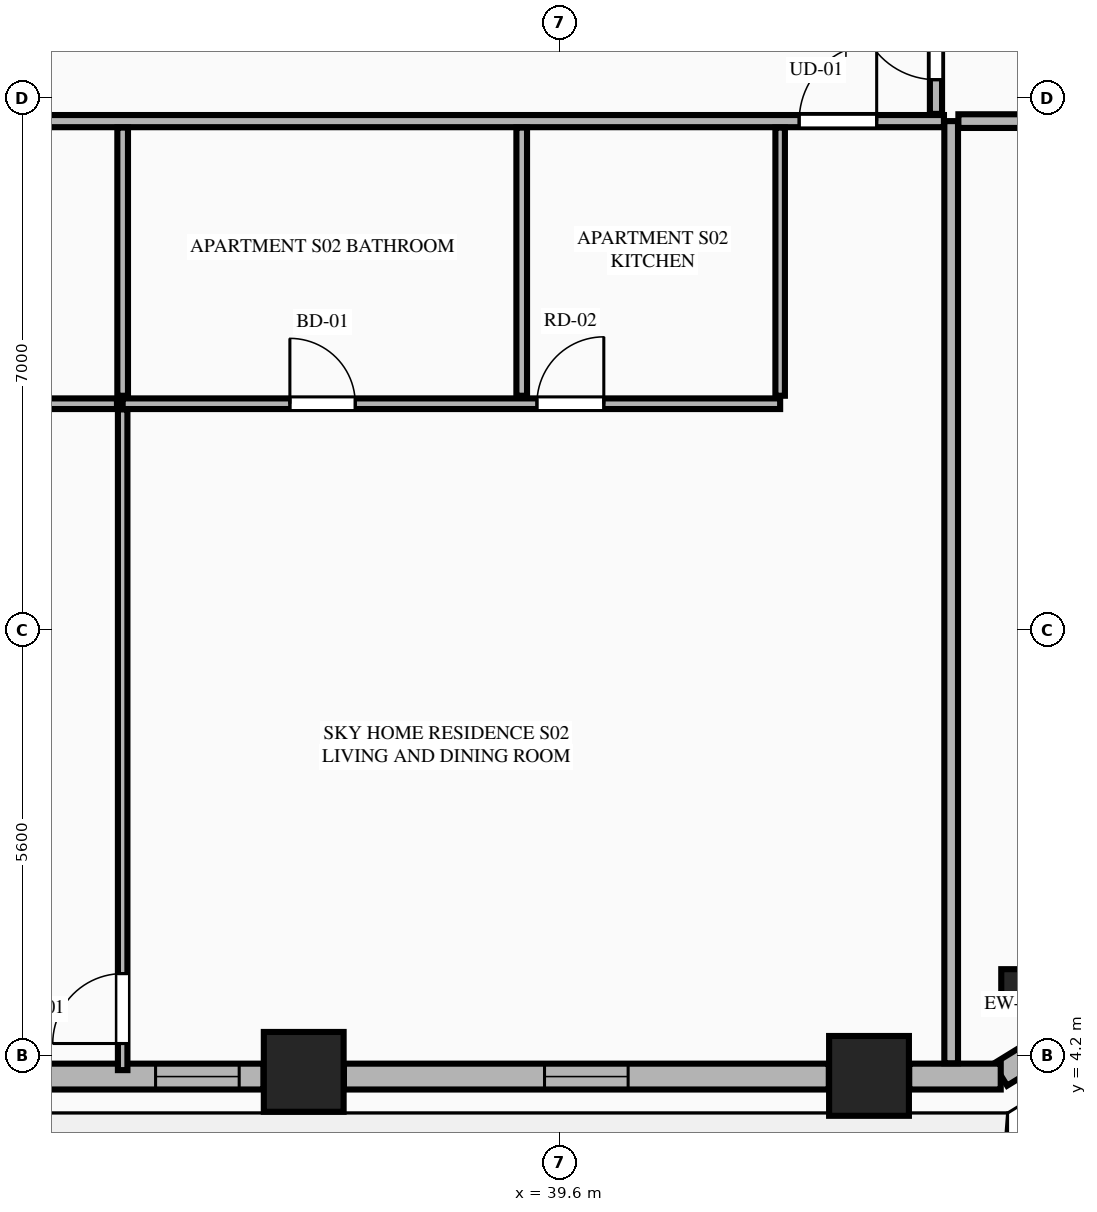
"""IFC4 building model, lengths in metres.
Left out: names, types, materials, properties, quantities, classifications, styles, units other than length and angle.
Written with IfcOpenShell. Run it as: python <this file> out.ifc"""

import sys

from ifc_helpers import new_model, si_unit, direction, frame, frame_2d, origin, origin_2d, place, context, subcontext, project, spatial, rectangle, extrude, element, fill, save


model = new_model("IFC4")
c1 = context("Model", 3, precision=1e-05, world=origin(), true_north=direction((0.0, 1.0)))
c2 = subcontext(c1, "Body", "Model", "MODEL_VIEW")
j1 = project(units=[si_unit("LENGTHUNIT", "METRE"), si_unit("PLANEANGLEUNIT", "RADIAN")], contexts=[c1])
p1 = place(None, origin())
s1 = spatial("IfcSite", under=j1, at=p1, CompositionType="ELEMENT")
p2 = place(p1, origin())
s2 = spatial("IfcBuilding", under=s1, at=p2, CompositionType="ELEMENT")
p3 = place(p2, frame((0.0, 0.0, 137.45)))
s3 = spatial("IfcBuildingStorey", under=s2, at=p3, CompositionType="ELEMENT", Elevation=137.45)
for number, where, z_axis, x_axis in (
    (1, (36.232, 3.992, 0.0), (0.0, 0.0, 1.0), (1.0, 0.0, 0.0)),
    (2, (43.669, 3.939, 0.0), (0.0, 0.0, 1.0), (1.0, 0.0, 0.0)),
):
    element("IfcColumn", number, at=place(p3, frame(where, z_axis=z_axis, x_axis=x_axis)), inside=s3, PredefinedType="COLUMN", context=c2, shape_type="SweptSolid", body=[
        extrude(rectangle(XDim=1.05, YDim=1.05, at=origin_2d()), origin(), (0.0, 0.0, 1.0), 3.55),
    ])
p4 = place(p3, frame((45.659, 5.093, 0.0), z_axis=(0.0, 0.0, 1.0), x_axis=(0.865160173452, 0.501495637342, 0.0)))
e3 = element("IfcColumn", 3, at=p4, inside=s3, PredefinedType="PILASTER", context=c2, shape_type="SweptSolid", body=[
    extrude(rectangle(XDim=0.5, YDim=0.35, at=origin_2d()), origin(), (0.0, 0.0, 1.0), 3.55),
])
p5 = place(p3, frame((45.397, 3.955, 0.0), z_axis=(0.0, 0.0, 1.0), x_axis=(0.851798915137, 0.523868884523, 0.0)))
e4 = element("IfcWall", 4, at=p5, inside=s3, PredefinedType="STANDARD", context=c2, shape_type="SweptSolid", body=[
    extrude(rectangle(XDim=1.848, YDim=0.34, at=frame_2d((0.924, 0.0))), origin(), (0.0, 0.0, 1.0), 3.34),
])
p6 = place(p3, frame((29.097, 3.93, 0.0), z_axis=(0.0, 0.0, 1.0), x_axis=(1.0, 0.0, 0.0)))
e5 = element("IfcWall", 5, at=p6, inside=s3, PredefinedType="STANDARD", context=c2, shape_type="SweptSolid", body=[
    extrude(rectangle(XDim=6.606, YDim=0.34, at=frame_2d((3.303, 0.0))), origin(), (0.0, 0.0, 1.0), 2.797),
])
p7 = place(p6, frame((1.775, 0.0, 0.0)))
e6 = element("IfcOpeningElement", 6, at=p7, cuts=e5, PredefinedType="OPENING", context=c2, shape_type="SweptSolid", body=[
    extrude(rectangle(XDim=1.1, YDim=2.25, at=frame_2d((0.55, 1.125))), frame((0.0, 0.18, 0.0), z_axis=(0.0, -1.0, 0.0), x_axis=(1.0, 0.0, 0.0)), (0.0, 0.0, 1.0), 0.36),
])
p8 = place(p6, frame((5.186, 0.0, 0.75)))
e7 = element("IfcOpeningElement", 7, at=p8, cuts=e5, PredefinedType="OPENING", context=c2, shape_type="SweptSolid", body=[
    extrude(rectangle(XDim=1.1, YDim=1.897, at=frame_2d((0.55, 0.948))), frame((0.0, 0.18, 0.0), z_axis=(0.0, -1.0, 0.0), x_axis=(1.0, 0.0, 0.0)), (0.0, 0.0, 1.0), 0.36),
])
p9 = place(p3, frame((36.761, 3.93, 0.0), z_axis=(0.0, 0.0, 1.0), x_axis=(1.0, 0.0, 0.0)))
e8 = element("IfcWall", 8, at=p9, inside=s3, PredefinedType="STANDARD", context=c2, shape_type="SweptSolid", body=[
    extrude(rectangle(XDim=6.379, YDim=0.34, at=frame_2d((3.189, 0.0))), origin(), (0.0, 0.0, 1.0), 2.797),
])
p10 = place(p9, frame((2.639, 0.0, 0.75)))
e9 = element("IfcOpeningElement", 9, at=p10, cuts=e8, PredefinedType="OPENING", context=c2, shape_type="SweptSolid", body=[
    extrude(rectangle(XDim=1.1, YDim=1.897, at=frame_2d((0.55, 0.948))), frame((0.0, 0.18, 0.0), z_axis=(0.0, -1.0, 0.0), x_axis=(1.0, 0.0, 0.0)), (0.0, 0.0, 1.0), 0.36),
])
p11 = place(p3, frame((44.198, 3.93, 0.0), z_axis=(0.0, 0.0, 1.0), x_axis=(1.0, 0.0, 0.0)))
e10 = element("IfcWall", 10, at=p11, inside=s3, PredefinedType="STANDARD", context=c2, shape_type="SweptSolid", body=[
    extrude(rectangle(XDim=1.204, YDim=0.34, at=frame_2d((0.602, 0.0))), origin(), (0.0, 0.0, 1.0), 3.34),
])
p12 = place(p3, frame((44.75, 4.105, 0.0), z_axis=(0.0, 0.0, 1.0), x_axis=(0.0, 1.0, 0.0)))
e11 = element("IfcWall", 11, at=p12, inside=s3, PredefinedType="PARTITIONING", context=c2, shape_type="SweptSolid", body=[
    extrude(rectangle(XDim=12.395, YDim=0.18, at=frame_2d((6.198, 0.0))), origin(), (0.0, 0.0, 1.0), 3.34),
])
p13 = place(p3, frame((28.663, 16.5, 0.0), z_axis=(0.0, 0.0, 1.0), x_axis=(1.0, 0.0, 0.0)))
e12 = element("IfcWall", 12, at=p13, inside=s3, PredefinedType="PARTITIONING", context=c2, shape_type="SweptSolid", body=[
    extrude(rectangle(XDim=15.992, YDim=0.16, at=frame_2d((7.996, 0.0))), origin(), (0.0, 0.0, 1.0), 3.34),
])
p14 = place(p13, frame((14.087, 0.0, 0.0)))
e13 = element("IfcOpeningElement", 13, at=p14, cuts=e12, PredefinedType="OPENING", context=c2, shape_type="SweptSolid", body=[
    extrude(rectangle(XDim=1.02, YDim=2.25, at=frame_2d((0.51, 1.125))), frame((0.0, 0.09, 0.0), z_axis=(0.0, -1.0, 0.0), x_axis=(1.0, 0.0, 0.0)), (0.0, 0.0, 1.0), 0.18),
])
p15 = place(p3, frame((42.5, 12.887, 0.0), z_axis=(0.0, 0.0, 1.0), x_axis=(0.0, 1.0, 0.0)))
e14 = element("IfcWall", 14, at=p15, inside=s3, PredefinedType="PARTITIONING", context=c2, shape_type="SweptSolid", body=[
    extrude(rectangle(XDim=3.528, YDim=0.125, at=frame_2d((1.764, 0.0))), origin(), (0.0, 0.0, 1.0), 2.722),
])
p16 = place(p3, frame((33.85, 12.782, 0.0), z_axis=(0.0, 0.0, 1.0), x_axis=(1.0, 0.0, 0.0)))
e15 = element("IfcWall", 15, at=p16, inside=s3, PredefinedType="PLUMBINGWALL", context=c2, shape_type="SweptSolid", body=[
    extrude(rectangle(XDim=8.65, YDim=0.14, at=frame_2d((4.325, 0.0))), origin(), (0.0, 0.0, 1.0), 3.34),
])
p17 = place(p16, frame((2.2, 0.0, 0.0)))
e16 = element("IfcOpeningElement", 16, at=p17, cuts=e15, PredefinedType="OPENING", context=c2, shape_type="SweptSolid", body=[
    extrude(rectangle(XDim=0.86, YDim=2.1, at=frame_2d((0.43, 1.05))), frame((0.0, 0.08, 0.0), z_axis=(0.0, -1.0, 0.0), x_axis=(1.0, 0.0, 0.0)), (0.0, 0.0, 1.0), 0.16),
])
p18 = place(p16, frame((5.45, 0.0, 0.0)))
e17 = element("IfcOpeningElement", 17, at=p18, cuts=e15, PredefinedType="OPENING", context=c2, shape_type="SweptSolid", body=[
    extrude(rectangle(XDim=0.88, YDim=2.15, at=frame_2d((0.44, 1.075))), frame((0.0, 0.08, 0.0), z_axis=(0.0, -1.0, 0.0), x_axis=(1.0, 0.0, 0.0)), (0.0, 0.0, 1.0), 0.16),
])
p19 = place(p3, frame((28.663, 12.782, 0.0), z_axis=(0.0, 0.0, 1.0), x_axis=(1.0, 0.0, 0.0)))
e18 = element("IfcWall", 18, at=p19, inside=s3, PredefinedType="PLUMBINGWALL", context=c2, shape_type="SweptSolid", body=[
    extrude(rectangle(XDim=5.112, YDim=0.14, at=frame_2d((2.556, 0.0))), origin(), (0.0, 0.0, 1.0), 3.34),
])
p20 = place(p19, frame((2.131, 0.0, 0.0)))
e19 = element("IfcOpeningElement", 19, at=p20, cuts=e18, PredefinedType="OPENING", context=c2, shape_type="SweptSolid", body=[
    extrude(rectangle(XDim=0.86, YDim=2.1, at=frame_2d((0.43, 1.05))), frame((0.0, 0.08, 0.0), z_axis=(0.0, -1.0, 0.0), x_axis=(1.0, 0.0, 0.0)), (0.0, 0.0, 1.0), 0.16),
])
for number, where, z_axis, x_axis in (
    (20, (39.1, 12.887, 0.0), (0.0, 0.0, 1.0), (0.0, 1.0, 0.0)),
    (21, (33.85, 12.887, 0.0), (0.0, 0.0, 1.0), (0.0, 1.0, 0.0)),
):
    element("IfcWall", number, at=place(p3, frame(where, z_axis=z_axis, x_axis=x_axis)), inside=s3, PredefinedType="PLUMBINGWALL", context=c2, shape_type="SweptSolid", body=[
        extrude(rectangle(XDim=3.528, YDim=0.14, at=frame_2d((1.764, 0.0))), origin(), (0.0, 0.0, 1.0), 3.34),
    ])
p21 = place(p3, frame((33.85, 4.015, 0.0), z_axis=(0.0, 0.0, 1.0), x_axis=(0.0, 1.0, 0.0)))
e22 = element("IfcWall", 22, at=p21, inside=s3, PredefinedType="PARTITIONING", context=c2, shape_type="SweptSolid", body=[
    extrude(rectangle(XDim=8.692, YDim=0.125, at=frame_2d((4.346, 0.0))), origin(), (0.0, 0.0, 1.0), 3.34),
])
p22 = place(p21, frame((0.35, 0.0, 0.0)))
e23 = element("IfcOpeningElement", 23, at=p22, cuts=e22, PredefinedType="OPENING", context=c2, shape_type="SweptSolid", body=[
    extrude(rectangle(XDim=0.92, YDim=2.15, at=frame_2d((0.46, 1.075))), frame((0.0, 0.073, 0.0), z_axis=(0.0, -1.0, 0.0), x_axis=(1.0, 0.0, 0.0)), (0.0, 0.0, 1.0), 0.145),
])
p23 = place(p3, frame((44.845, 16.5, 0.0), z_axis=(0.0, 0.0, 1.0), x_axis=(1.0, 0.0, 0.0)))
e24 = element("IfcWall", 24, at=p23, inside=s3, PredefinedType="PARTITIONING", context=c2, shape_type="SweptSolid", body=[
    extrude(rectangle(XDim=7.77, YDim=0.18, at=frame_2d((3.885, 0.0))), origin(), (0.0, 0.0, 1.0), 3.34),
])
p24 = place(p3, frame((44.55, 16.595, 0.0), z_axis=(0.0, 0.0, 1.0), x_axis=(0.0, 1.0, 0.0)))
e25 = element("IfcWall", 25, at=p24, inside=s3, PredefinedType="PARTITIONING", context=c2, shape_type="SweptSolid", body=[
    extrude(rectangle(XDim=9.21, YDim=0.16, at=frame_2d((4.605, 0.0))), origin(), (0.0, 0.0, 1.0), 3.34),
])
p25 = place(p24, frame((0.45, 0.0, 0.0)))
e26 = element("IfcOpeningElement", 26, at=p25, cuts=e25, PredefinedType="OPENING", context=c2, shape_type="SweptSolid", body=[
    extrude(rectangle(XDim=1.02, YDim=2.25, at=frame_2d((0.51, 1.125))), frame((0.0, 0.09, 0.0), z_axis=(0.0, -1.0, 0.0), x_axis=(1.0, 0.0, 0.0)), (0.0, 0.0, 1.0), 0.18),
])
p26 = place(p10, origin())
e27 = element("IfcWindow", 27, at=p26, inside=s3, PartitioningType="SINGLE_PANEL", PredefinedType="WINDOW", context=c2, shape_type="SweptSolid", body=[
    extrude(rectangle(XDim=1.1, YDim=1.897, at=frame_2d((0.55, 0.948))), frame((0.0, 0.03, 0.0), z_axis=(0.0, -1.0, 0.0), x_axis=(1.0, 0.0, 0.0)), (0.0, 0.0, 1.0), 0.06),
])
fill(e9, e27)
p27 = place(p17, origin())
e28 = element("IfcDoor", 28, at=p27, inside=s3, OperationType="SINGLE_SWING_LEFT", PredefinedType="DOOR", context=c2, shape_type="SweptSolid", body=[
    extrude(rectangle(XDim=0.86, YDim=2.1, at=frame_2d((0.43, 1.05))), frame((0.0, 0.025, 0.0), z_axis=(0.0, -1.0, 0.0), x_axis=(1.0, 0.0, 0.0)), (0.0, 0.0, 1.0), 0.05),
])
fill(e16, e28)
p28 = place(p14, origin())
e29 = element("IfcDoor", 29, at=p28, inside=s3, OperationType="SINGLE_SWING_RIGHT", PredefinedType="DOOR", context=c2, shape_type="SweptSolid", body=[
    extrude(rectangle(XDim=1.02, YDim=2.25, at=frame_2d((0.51, 1.125))), frame((0.0, 0.025, 0.0), z_axis=(0.0, -1.0, 0.0), x_axis=(1.0, 0.0, 0.0)), (0.0, 0.0, 1.0), 0.05),
])
fill(e13, e29)
p29 = place(p18, origin())
e30 = element("IfcDoor", 30, at=p29, inside=s3, OperationType="SINGLE_SWING_RIGHT", PredefinedType="DOOR", context=c2, shape_type="SweptSolid", body=[
    extrude(rectangle(XDim=0.88, YDim=2.15, at=frame_2d((0.44, 1.075))), frame((0.0, 0.025, 0.0), z_axis=(0.0, -1.0, 0.0), x_axis=(1.0, 0.0, 0.0)), (0.0, 0.0, 1.0), 0.05),
])
fill(e17, e30)
p30 = place(p22, origin())
e31 = element("IfcDoor", 31, at=p30, inside=s3, OperationType="SINGLE_SWING_LEFT", PredefinedType="DOOR", context=c2, shape_type="SweptSolid", body=[
    extrude(rectangle(XDim=0.92, YDim=2.15, at=frame_2d((0.46, 1.075))), frame((0.0, 0.025, 0.0), z_axis=(0.0, -1.0, 0.0), x_axis=(1.0, 0.0, 0.0)), (0.0, 0.0, 1.0), 0.05),
])
fill(e23, e31)
p31 = place(p25, origin())
e32 = element("IfcDoor", 32, at=p31, inside=s3, OperationType="SINGLE_SWING_RIGHT", PredefinedType="DOOR", context=c2, shape_type="SweptSolid", body=[
    extrude(rectangle(XDim=1.02, YDim=2.25, at=frame_2d((0.51, 1.125))), frame((0.0, 0.025, 0.0), z_axis=(0.0, -1.0, 0.0), x_axis=(1.0, 0.0, 0.0)), (0.0, 0.0, 1.0), 0.05),
])
fill(e26, e32)
p32 = place(p8, origin())
e33 = element("IfcWindow", 33, at=p32, inside=s3, PartitioningType="SINGLE_PANEL", PredefinedType="WINDOW", context=c2, shape_type="SweptSolid", body=[
    extrude(rectangle(XDim=1.1, YDim=1.897, at=frame_2d((0.55, 0.948))), frame((0.0, 0.03, 0.0), z_axis=(0.0, -1.0, 0.0), x_axis=(1.0, 0.0, 0.0)), (0.0, 0.0, 1.0), 0.06),
])
fill(e7, e33)
save(model, sys.argv[1])
